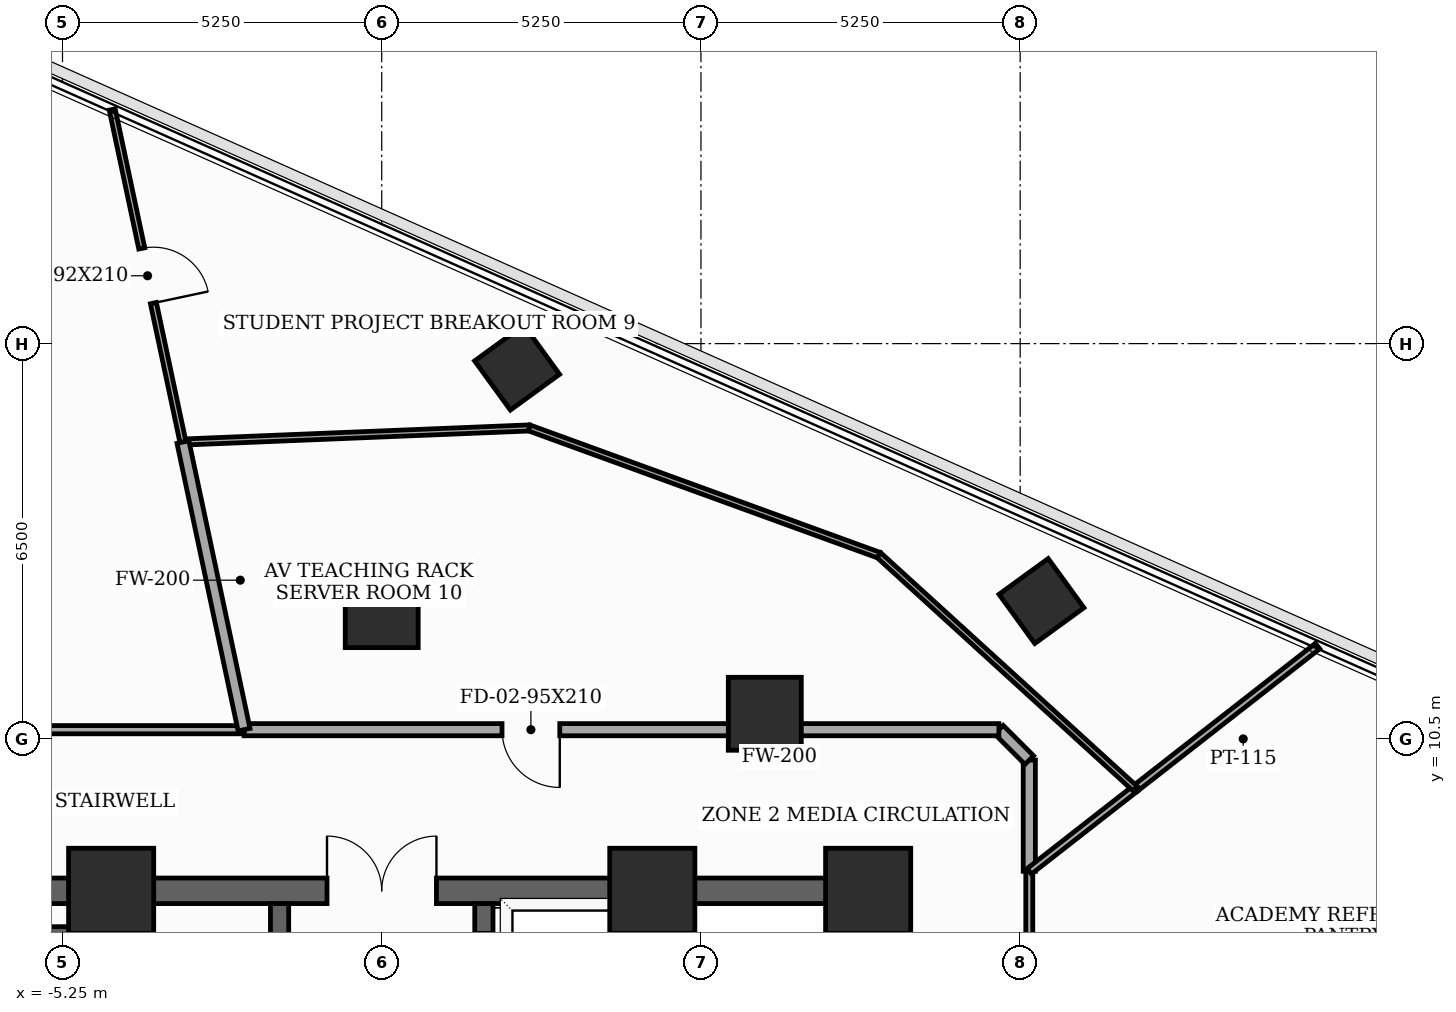
"""IFC4 building model, lengths in metres.
Left out: names, types, materials, properties, quantities, classifications, styles, units other than length and angle.
Written with IfcOpenShell. Run it as: python <this file> out.ifc"""

import sys

from ifc_helpers import new_model, si_unit, direction, frame, frame_2d, origin, origin_2d, place, context, subcontext, project, spatial, rectangle, extrude, element, fill, save


model = new_model("IFC4")
c1 = context("Model", 3, precision=1e-05, world=origin(), true_north=direction((0.0, 1.0)))
c2 = subcontext(c1, "Body", "Model", "MODEL_VIEW")
j1 = project(units=[si_unit("LENGTHUNIT", "METRE"), si_unit("PLANEANGLEUNIT", "RADIAN")], contexts=[c1])
p1 = place(None, origin())
s1 = spatial("IfcSite", under=j1, at=p1, CompositionType="ELEMENT")
p2 = place(p1, origin())
s2 = spatial("IfcBuilding", under=s1, at=p2, CompositionType="ELEMENT")
p3 = place(p2, frame((0.0, 0.0, 173.1)))
s3 = spatial("IfcBuildingStorey", under=s2, at=p3, CompositionType="ELEMENT", Elevation=173.1)
for number, where, z_axis, x_axis in (
    (1, (8.0, 8.0, 0.0), (0.0, 0.0, 1.0), (1.0, 0.0, 0.0)),
    (2, (4.45, 8.0, 0.0), (0.0, 0.0, 1.0), (1.0, 0.0, 0.0)),
    (3, (-4.45, 8.0, 0.0), (0.0, 0.0, 1.0), (1.0, 0.0, 0.0)),
):
    element("IfcColumn", number, at=place(p3, frame(where, z_axis=z_axis, x_axis=x_axis)), inside=s3, PredefinedType="COLUMN", context=c2, shape_type="SweptSolid", body=[
        extrude(rectangle(XDim=1.4, YDim=1.4, at=origin_2d()), origin(), (0.0, 0.0, 1.0), 3.7),
    ])
for number, where, z_axis, x_axis in (
    (4, (6.3, 10.912, 0.0), (0.0, 0.0, 1.0), (1.0, 0.0, 0.0)),
    (5, (0.0, 12.6, 0.0), (0.0, 0.0, 1.0), (1.0, 0.0, 0.0)),
):
    element("IfcColumn", number, at=place(p3, frame(where, z_axis=z_axis, x_axis=x_axis)), inside=s3, PredefinedType="COLUMN", context=c2, shape_type="SweptSolid", body=[
        extrude(rectangle(XDim=1.2, YDim=1.2, at=origin_2d()), origin(), (0.0, 0.0, 1.0), 3.7),
    ])
for number, where, z_axis, x_axis in (
    (6, (10.85, 12.766, 0.0), (0.0, 0.0, 1.0), (0.809, 0.588, 0.0)),
    (7, (2.227, 16.605, 0.0), (0.0, 0.0, 1.0), (0.809, 0.588, 0.0)),
):
    element("IfcColumn", number, at=place(p3, frame(where, z_axis=z_axis, x_axis=x_axis)), inside=s3, PredefinedType="COLUMN", context=c2, shape_type="SweptSolid", body=[
        extrude(rectangle(XDim=1.0, YDim=1.0, at=origin_2d()), origin(), (0.0, 0.0, 1.0), 3.7),
    ])
p4 = place(p3, frame((8.0, -8.0, 0.0), z_axis=(0.0, 0.0, 1.0), x_axis=(0.0, 1.0, 0.0)))
e8 = element("IfcWall", 8, at=p4, inside=s3, PredefinedType="SHEAR", context=c2, shape_type="SweptSolid", body=[
    extrude(rectangle(XDim=16.0, YDim=0.42, at=frame_2d((8.0, 0.0))), origin(), (0.0, 0.0, 1.0), 3.5),
])
p5 = place(p4, frame((9.6, 0.0, 0.0)))
e9 = element("IfcOpeningElement", 9, at=p5, cuts=e8, PredefinedType="OPENING", context=c2, shape_type="SweptSolid", body=[
    extrude(rectangle(XDim=1.05, YDim=2.15, at=frame_2d((0.525, 1.075))), frame((0.0, 0.22, 0.0), z_axis=(0.0, -1.0, 0.0), x_axis=(1.0, 0.0, 0.0)), (0.0, 0.0, 1.0), 0.44),
])
p6 = place(p4, frame((14.229, 0.0, 0.0)))
e10 = element("IfcOpeningElement", 10, at=p6, cuts=e8, PredefinedType="OPENING", context=c2, shape_type="SweptSolid", body=[
    extrude(rectangle(XDim=0.85, YDim=2.02, at=frame_2d((0.425, 1.01))), frame((0.0, 0.22, 0.0), z_axis=(0.0, -1.0, 0.0), x_axis=(1.0, 0.0, 0.0)), (0.0, 0.0, 1.0), 0.44),
])
p7 = place(p3, frame((-8.0, 8.0, 0.0), z_axis=(0.0, 0.0, 1.0), x_axis=(1.0, 0.0, 0.0)))
e11 = element("IfcWall", 11, at=p7, inside=s3, PredefinedType="SHEAR", context=c2, shape_type="SweptSolid", body=[
    extrude(rectangle(XDim=16.0, YDim=0.42, at=frame_2d((8.0, 0.0))), origin(), (0.0, 0.0, 1.0), 3.5),
])
p8 = place(p7, frame((7.1, 0.0, 0.0)))
e12 = element("IfcOpeningElement", 12, at=p8, cuts=e11, PredefinedType="OPENING", context=c2, shape_type="SweptSolid", body=[
    extrude(rectangle(XDim=1.8, YDim=2.15, at=frame_2d((0.9, 1.075))), frame((0.0, 0.22, 0.0), z_axis=(0.0, -1.0, 0.0), x_axis=(1.0, 0.0, 0.0)), (0.0, 0.0, 1.0), 0.44),
])
for number, where, z_axis, x_axis in (
    (13, (-4.45, -7.79, 0.0), (0.0, 0.0, 1.0), (0.0, 1.0, 0.0)),
    (14, (4.45, -7.79, 0.0), (0.0, 0.0, 1.0), (0.0, 1.0, 0.0)),
):
    element("IfcWall", number, at=place(p3, frame(where, z_axis=z_axis, x_axis=x_axis)), inside=s3, PredefinedType="SHEAR", context=c2, shape_type="SweptSolid", body=[
        extrude(rectangle(XDim=15.58, YDim=0.3, at=frame_2d((7.79, 0.0))), origin(), (0.0, 0.0, 1.0), 3.5),
    ])
p9 = place(p3, frame((-7.79, 7.26, 0.0), z_axis=(0.0, 0.0, 1.0), x_axis=(1.0, 0.0, 0.0)))
e15 = element("IfcWall", 15, at=p9, inside=s3, PredefinedType="SHEAR", context=c2, shape_type="SweptSolid", body=[
    extrude(rectangle(XDim=3.34, YDim=0.3, at=frame_2d((1.67, 0.0))), origin(), (0.0, 0.0, 1.0), 3.5),
])
p10 = place(p3, frame((-1.68, -4.85, 0.0), z_axis=(0.0, 0.0, 1.0), x_axis=(0.0, 1.0, 0.0)))
e16 = element("IfcWall", 16, at=p10, inside=s3, PredefinedType="SHEAR", context=c2, shape_type="SweptSolid", body=[
    extrude(rectangle(XDim=12.64, YDim=0.3, at=frame_2d((6.32, 0.0))), origin(), (0.0, 0.0, 1.0), 3.5),
])
p11 = place(p10, frame((3.5, 0.0, 0.0)))
e17 = element("IfcOpeningElement", 17, at=p11, cuts=e16, PredefinedType="OPENING", context=c2, shape_type="SweptSolid", body=[
    extrude(rectangle(XDim=0.95, YDim=2.1, at=frame_2d((0.475, 1.05))), frame((0.0, 0.16, 0.0), z_axis=(0.0, -1.0, 0.0), x_axis=(1.0, 0.0, 0.0)), (0.0, 0.0, 1.0), 0.32),
])
p12 = place(p10, frame((9.8, 0.0, 0.0)))
e18 = element("IfcOpeningElement", 18, at=p12, cuts=e16, PredefinedType="OPENING", context=c2, shape_type="SweptSolid", body=[
    extrude(rectangle(XDim=0.95, YDim=2.1, at=frame_2d((0.475, 1.05))), frame((0.0, 0.16, 0.0), z_axis=(0.0, -1.0, 0.0), x_axis=(1.0, 0.0, 0.0)), (0.0, 0.0, 1.0), 0.32),
])
p13 = place(p3, frame((1.68, -4.85, 0.0), z_axis=(0.0, 0.0, 1.0), x_axis=(0.0, 1.0, 0.0)))
e19 = element("IfcWall", 19, at=p13, inside=s3, PredefinedType="SHEAR", context=c2, shape_type="SweptSolid", body=[
    extrude(rectangle(XDim=12.64, YDim=0.3, at=frame_2d((6.32, 0.0))), origin(), (0.0, 0.0, 1.0), 3.5),
])
p14 = place(p13, frame((0.55, 0.0, 0.0)))
e20 = element("IfcOpeningElement", 20, at=p14, cuts=e19, PredefinedType="OPENING", context=c2, shape_type="SweptSolid", body=[
    extrude(rectangle(XDim=1.1, YDim=2.1, at=frame_2d((0.55, 1.05))), frame((0.0, 0.16, 0.0), z_axis=(0.0, -1.0, 0.0), x_axis=(1.0, 0.0, 0.0)), (0.0, 0.0, 1.0), 0.32),
])
p15 = place(p13, frame((2.65, 0.0, 0.0)))
e21 = element("IfcOpeningElement", 21, at=p15, cuts=e19, PredefinedType="OPENING", context=c2, shape_type="SweptSolid", body=[
    extrude(rectangle(XDim=1.1, YDim=2.1, at=frame_2d((0.55, 1.05))), frame((0.0, 0.16, 0.0), z_axis=(0.0, -1.0, 0.0), x_axis=(1.0, 0.0, 0.0)), (0.0, 0.0, 1.0), 0.32),
])
p16 = place(p13, frame((4.75, 0.0, 0.0)))
e22 = element("IfcOpeningElement", 22, at=p16, cuts=e19, PredefinedType="OPENING", context=c2, shape_type="SweptSolid", body=[
    extrude(rectangle(XDim=1.1, YDim=2.1, at=frame_2d((0.55, 1.05))), frame((0.0, 0.16, 0.0), z_axis=(0.0, -1.0, 0.0), x_axis=(1.0, 0.0, 0.0)), (0.0, 0.0, 1.0), 0.32),
])
p17 = place(p13, frame((6.85, 0.0, 0.0)))
e23 = element("IfcOpeningElement", 23, at=p17, cuts=e19, PredefinedType="OPENING", context=c2, shape_type="SweptSolid", body=[
    extrude(rectangle(XDim=1.1, YDim=2.1, at=frame_2d((0.55, 1.05))), frame((0.0, 0.16, 0.0), z_axis=(0.0, -1.0, 0.0), x_axis=(1.0, 0.0, 0.0)), (0.0, 0.0, 1.0), 0.32),
])
p18 = place(p13, frame((8.95, 0.0, 0.0)))
e24 = element("IfcOpeningElement", 24, at=p18, cuts=e19, PredefinedType="OPENING", context=c2, shape_type="SweptSolid", body=[
    extrude(rectangle(XDim=1.1, YDim=2.1, at=frame_2d((0.55, 1.05))), frame((0.0, 0.16, 0.0), z_axis=(0.0, -1.0, 0.0), x_axis=(1.0, 0.0, 0.0)), (0.0, 0.0, 1.0), 0.32),
])
p19 = place(p13, frame((11.05, 0.0, 0.0)))
e25 = element("IfcOpeningElement", 25, at=p19, cuts=e19, PredefinedType="OPENING", context=c2, shape_type="SweptSolid", body=[
    extrude(rectangle(XDim=1.1, YDim=2.1, at=frame_2d((0.55, 1.05))), frame((0.0, 0.16, 0.0), z_axis=(0.0, -1.0, 0.0), x_axis=(1.0, 0.0, 0.0)), (0.0, 0.0, 1.0), 0.32),
])
p20 = place(p3, frame((10.65, 2.264, 0.0), z_axis=(0.0, 0.0, 1.0), x_axis=(0.0, 1.0, 0.0)))
e26 = element("IfcWall", 26, at=p20, inside=s3, PredefinedType="PARTITIONING", context=c2, shape_type="SweptSolid", body=[
    extrude(rectangle(XDim=6.057, YDim=0.115, at=frame_2d((3.029, 0.0))), origin(), (0.0, 0.0, 1.0), 2.075),
])
p21 = place(p20, frame((0.736, 0.0, 0.0)))
e27 = element("IfcOpeningElement", 27, at=p21, cuts=e26, PredefinedType="OPENING", context=c2, shape_type="SweptSolid", body=[
    extrude(rectangle(XDim=0.95, YDim=2.025, at=frame_2d((0.475, 1.012))), frame((0.0, 0.067, 0.0), z_axis=(0.0, -1.0, 0.0), x_axis=(1.0, 0.0, 0.0)), (0.0, 0.0, 1.0), 0.135),
])
p22 = place(p3, frame((10.65, 8.321, 0.0), z_axis=(0.0, 0.0, 1.0), x_axis=(0.0, 1.0, 0.0)))
e28 = element("IfcWall", 28, at=p22, inside=s3, PredefinedType="SOLIDWALL", context=c2, shape_type="SweptSolid", body=[
    extrude(rectangle(XDim=1.829, YDim=0.2, at=frame_2d((0.915, 0.0))), origin(), (0.0, 0.0, 1.0), 2.075),
])
p23 = place(p3, frame((10.65, 10.15, 0.0), z_axis=(0.0, 0.0, 1.0), x_axis=(-0.707106781187, 0.707106781187, 0.0)))
e29 = element("IfcWall", 29, at=p23, inside=s3, PredefinedType="SOLIDWALL", context=c2, shape_type="SweptSolid", body=[
    extrude(rectangle(XDim=0.707, YDim=0.2, at=frame_2d((0.354, 0.0))), origin(), (0.0, 0.0, 1.0), 2.075),
])
p24 = place(p3, frame((10.15, 10.65, 0.0), z_axis=(0.0, 0.0, 1.0), x_axis=(-1.0, 0.0, 0.0)))
e30 = element("IfcWall", 30, at=p24, inside=s3, PredefinedType="SOLIDWALL", context=c2, shape_type="SweptSolid", body=[
    extrude(rectangle(XDim=12.414, YDim=0.2, at=frame_2d((6.207, 0.0))), origin(), (0.0, 0.0, 1.0), 2.875),
])
p25 = place(p24, frame((7.222, 0.0, 0.0)))
e31 = element("IfcOpeningElement", 31, at=p25, cuts=e30, PredefinedType="OPENING", context=c2, shape_type="SweptSolid", body=[
    extrude(rectangle(XDim=0.95, YDim=2.1, at=frame_2d((0.475, 1.05))), frame((0.0, 0.11, 0.0), z_axis=(0.0, -1.0, 0.0), x_axis=(1.0, 0.0, 0.0)), (0.0, 0.0, 1.0), 0.22),
])
p26 = place(p3, frame((-2.264, 10.65, 0.0), z_axis=(0.0, 0.0, 1.0), x_axis=(-1.0, 0.0, 0.0)))
e32 = element("IfcWall", 32, at=p26, inside=s3, PredefinedType="PARTITIONING", context=c2, shape_type="SweptSolid", body=[
    extrude(rectangle(XDim=7.886, YDim=0.135, at=frame_2d((3.943, 0.0))), origin(), (0.0, 0.0, 1.0), 2.885),
])
p27 = place(p3, frame((15.391, 12.025, 0.0), z_axis=(0.0, 0.0, 1.0), x_axis=(-0.787968951689, -0.615714975597, 0.0)))
e33 = element("IfcWall", 33, at=p27, inside=s3, PredefinedType="PARTITIONING", context=c2, shape_type="SweptSolid", body=[
    extrude(rectangle(XDim=3.807, YDim=0.115, at=frame_2d((1.903, 0.0))), origin(), (0.0, 0.0, 1.0), 2.975),
])
p28 = place(p3, frame((12.391, 9.681, 0.0), z_axis=(0.0, 0.0, 1.0), x_axis=(-0.788124883644, -0.615515367624, 0.0)))
e34 = element("IfcWall", 34, at=p28, inside=s3, PredefinedType="PARTITIONING", context=c2, shape_type="SweptSolid", body=[
    extrude(rectangle(XDim=2.209, YDim=0.115, at=frame_2d((1.104, 0.0))), origin(), (0.0, 0.0, 1.0), 2.075),
])
p29 = place(p3, frame((-3.269, 15.381, 0.0), z_axis=(0.0, 0.0, 1.0), x_axis=(0.999171753478, 0.040691609114, 0.0)))
e35 = element("IfcWall", 35, at=p29, inside=s3, PredefinedType="MOVABLE", context=c2, shape_type="SweptSolid", body=[
    extrude(rectangle(XDim=5.7, YDim=0.1, at=frame_2d((2.85, 0.0))), origin(), (0.0, 0.0, 1.0), 2.885),
])
p30 = place(p3, frame((2.426, 15.613, 0.0), z_axis=(0.0, 0.0, 1.0), x_axis=(0.939701375228, -0.341996089736, 0.0)))
e36 = element("IfcWall", 36, at=p30, inside=s3, PredefinedType="MOVABLE", context=c2, shape_type="SweptSolid", body=[
    extrude(rectangle(XDim=6.12, YDim=0.1, at=frame_2d((3.06, 0.0))), origin(), (0.0, 0.0, 1.0), 3.49),
])
p31 = place(p3, frame((8.177, 13.52, 0.0), z_axis=(0.0, 0.0, 1.0), x_axis=(0.739232344885, -0.673450473514, 0.0)))
e37 = element("IfcWall", 37, at=p31, inside=s3, PredefinedType="MOVABLE", context=c2, shape_type="SweptSolid", body=[
    extrude(rectangle(XDim=5.701, YDim=0.1, at=frame_2d((2.85, 0.0))), origin(), (0.0, 0.0, 1.0), 2.075),
])
p32 = place(p3, frame((-4.432, 20.851, 0.0), z_axis=(0.0, 0.0, 1.0), x_axis=(0.208032106743, -0.978121997792, 0.0)))
e38 = element("IfcWall", 38, at=p32, inside=s3, PredefinedType="MOVABLE", context=c2, shape_type="SweptSolid", body=[
    extrude(rectangle(XDim=5.592, YDim=0.1, at=frame_2d((2.796, 0.0))), origin(), (0.0, 0.0, 1.0), 2.985),
])
p33 = place(p32, frame((2.336, 0.0, 0.0)))
e39 = element("IfcOpeningElement", 39, at=p33, cuts=e38, PredefinedType="OPENING", context=c2, shape_type="SweptSolid", body=[
    extrude(rectangle(XDim=0.92, YDim=2.1, at=frame_2d((0.46, 1.05))), frame((0.0, 0.06, 0.0), z_axis=(0.0, -1.0, 0.0), x_axis=(1.0, 0.0, 0.0)), (0.0, 0.0, 1.0), 0.12),
])
p34 = place(p3, frame((-3.269, 15.381, 0.0), z_axis=(0.0, 0.0, 1.0), x_axis=(0.207808649559, -0.978169497157, 0.0)))
e40 = element("IfcWall", 40, at=p34, inside=s3, PredefinedType="SOLIDWALL", context=c2, shape_type="SweptSolid", body=[
    extrude(rectangle(XDim=4.837, YDim=0.2, at=frame_2d((2.418, 0.0))), origin(), (0.0, 0.0, 1.0), 2.885),
])
p35 = place(p8, origin())
e41 = element("IfcDoor", 41, at=p35, inside=s3, OperationType="DOUBLE_DOOR_SINGLE_SWING", PredefinedType="DOOR", context=c2, shape_type="SweptSolid", body=[
    extrude(rectangle(XDim=1.8, YDim=2.15, at=frame_2d((0.9, 1.075))), frame((0.0, 0.025, 0.0), z_axis=(0.0, -1.0, 0.0), x_axis=(1.0, 0.0, 0.0)), (0.0, 0.0, 1.0), 0.05),
])
fill(e12, e41)
p36 = place(p25, origin())
e42 = element("IfcDoor", 42, at=p36, inside=s3, OperationType="SINGLE_SWING_LEFT", PredefinedType="DOOR", context=c2, shape_type="SweptSolid", body=[
    extrude(rectangle(XDim=0.95, YDim=2.1, at=frame_2d((0.475, 1.05))), frame((0.0, 0.025, 0.0), z_axis=(0.0, -1.0, 0.0), x_axis=(1.0, 0.0, 0.0)), (0.0, 0.0, 1.0), 0.05),
])
fill(e31, e42)
p37 = place(p33, origin())
e43 = element("IfcDoor", 43, at=p37, inside=s3, OperationType="SINGLE_SWING_RIGHT", PredefinedType="DOOR", context=c2, shape_type="SweptSolid", body=[
    extrude(rectangle(XDim=0.92, YDim=2.1, at=frame_2d((0.46, 1.05))), frame((0.0, 0.025, 0.0), z_axis=(0.0, -1.0, 0.0), x_axis=(1.0, 0.0, 0.0)), (0.0, 0.0, 1.0), 0.05),
])
fill(e39, e43)
save(model, sys.argv[1])
